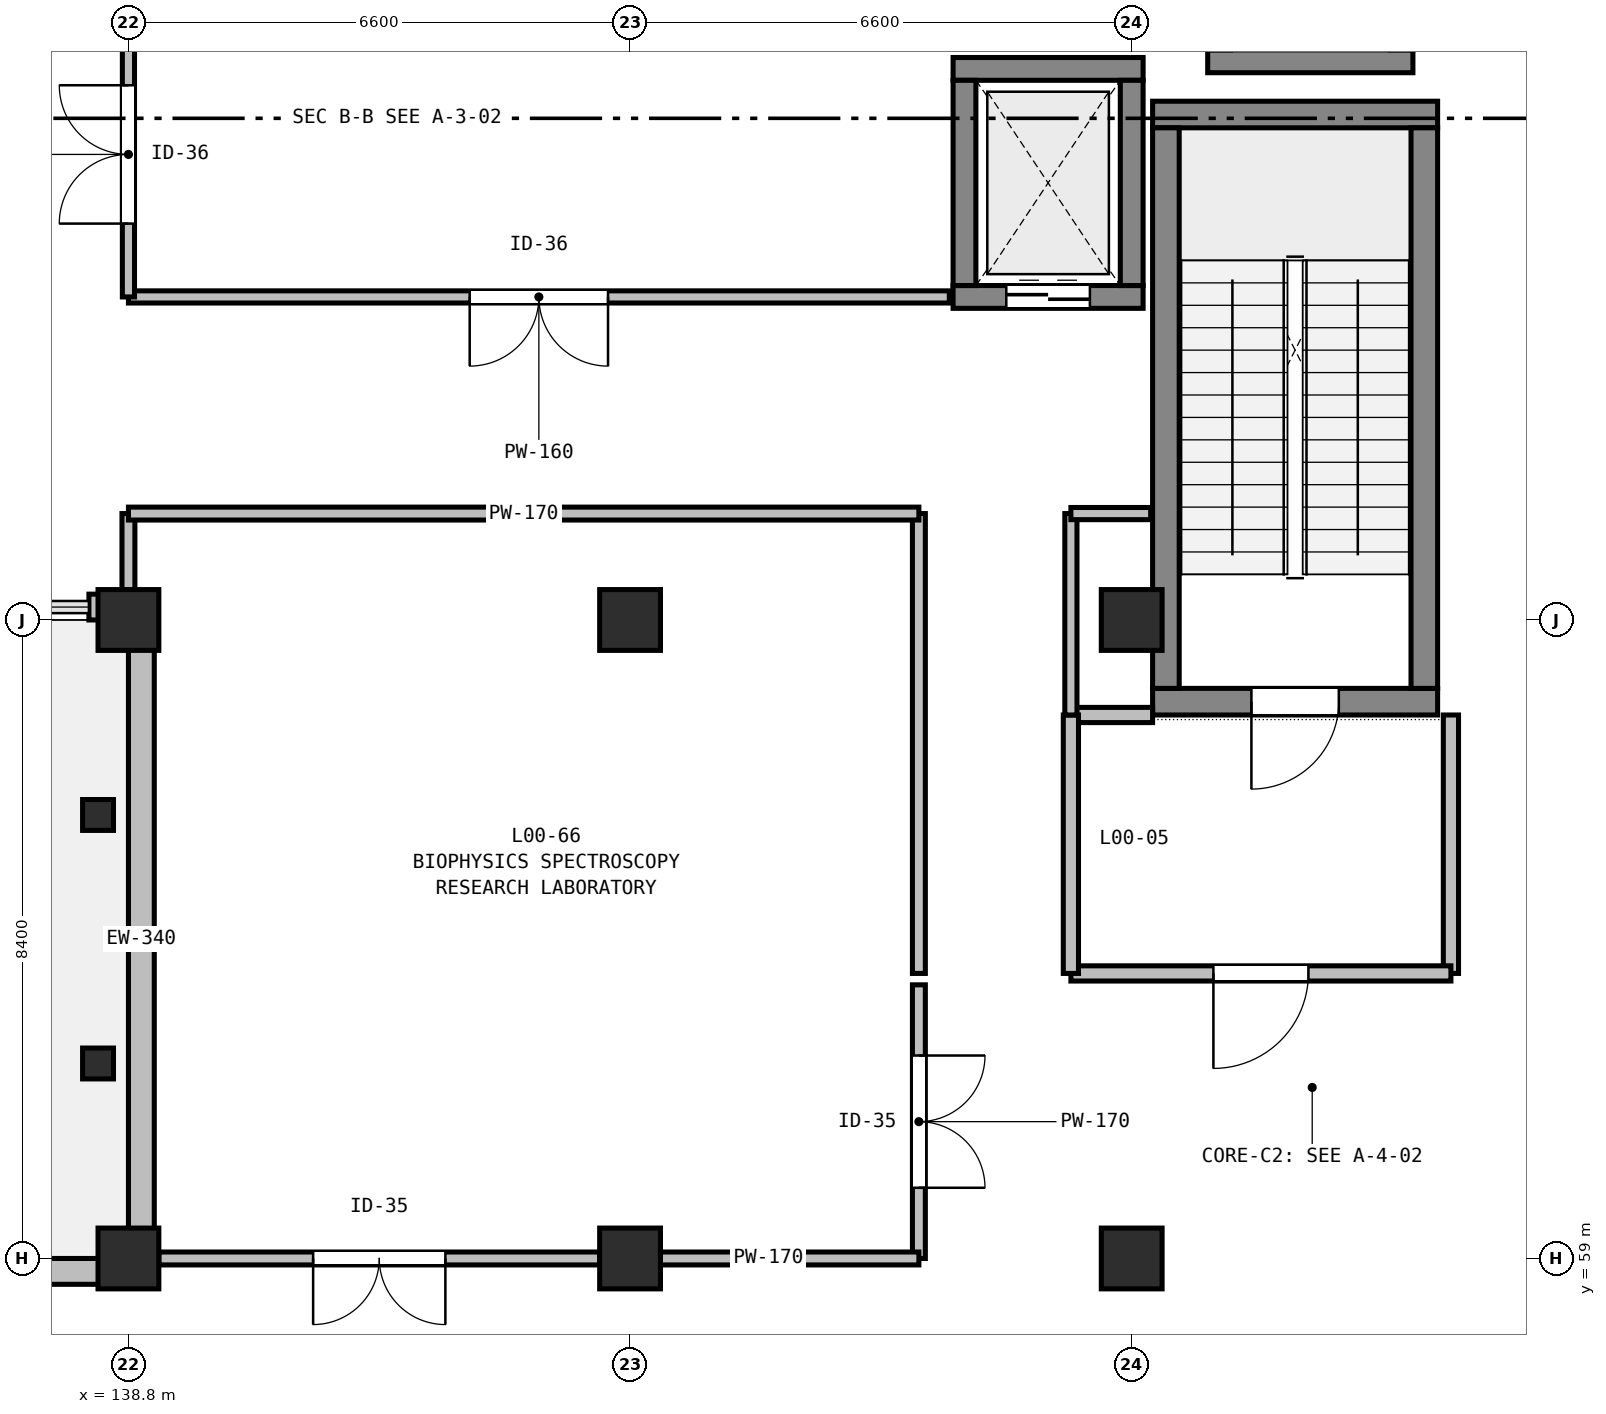
"""IFC4 building model, lengths in metres.
Left out: names, types, materials, properties, quantities, classifications, styles, units other than length and angle.
Written with IfcOpenShell. Run it as: python <this file> out.ifc"""

import sys

from ifc_helpers import new_model, si_unit, direction, frame, frame_2d, origin, origin_2d, place, context, subcontext, project, spatial, rectangle, hollow_circle, extrude, element, fill, save


model = new_model("IFC4")
c1 = context("Model", 3, precision=1e-05, world=origin(), true_north=direction((0.0, 1.0)))
c2 = subcontext(c1, "Body", "Model", "MODEL_VIEW")
j1 = project(units=[si_unit("LENGTHUNIT", "METRE"), si_unit("PLANEANGLEUNIT", "RADIAN")], contexts=[c1])
p1 = place(None, origin())
s1 = spatial("IfcSite", under=j1, at=p1, CompositionType="ELEMENT")
p2 = place(p1, origin())
s2 = spatial("IfcBuilding", under=s1, at=p2, CompositionType="ELEMENT")
p3 = place(p2, origin())
s3 = spatial("IfcBuildingStorey", under=s2, at=p3, CompositionType="ELEMENT", Elevation=0.0)
for number, where, z_axis, x_axis in (
    (1, (138.8, 59.0, 0.0), (0.0, 0.0, 1.0), (1.0, 0.0, 0.0)),
    (2, (138.8, 67.4, 0.0), (0.0, 0.0, 1.0), (1.0, 0.0, 0.0)),
    (3, (145.4, 59.0, 0.0), (0.0, 0.0, 1.0), (1.0, 0.0, 0.0)),
    (4, (145.4, 67.4, 0.0), (0.0, 0.0, 1.0), (1.0, 0.0, 0.0)),
    (5, (152.0, 59.0, 0.0), (0.0, 0.0, 1.0), (1.0, 0.0, 0.0)),
    (6, (152.0, 67.4, 0.0), (0.0, 0.0, 1.0), (1.0, 0.0, 0.0)),
):
    element("IfcColumn", number, at=place(p3, frame(where, z_axis=z_axis, x_axis=x_axis)), inside=s3, PredefinedType="COLUMN", context=c2, shape_type="SweptSolid", body=[
        extrude(rectangle(XDim=0.8, YDim=0.8, at=origin_2d()), origin(), (0.0, 0.0, 1.0), 5.4),
    ])
p4 = place(p3, frame((156.025, 66.325, 0.0), z_axis=(0.0, 0.0, 1.0), x_axis=(-1.0, 0.0, 0.0)))
e7 = element("IfcWall", 7, at=p4, inside=s3, PredefinedType="SHEAR", context=c2, shape_type="SweptSolid", body=[
    extrude(rectangle(XDim=3.75, YDim=0.35, at=frame_2d((1.875, 0.0))), origin(), (0.0, 0.0, 1.0), 5.4),
])
p5 = place(p4, frame((1.3, 0.0, 0.0)))
e8 = element("IfcOpeningElement", 8, at=p5, cuts=e7, PredefinedType="OPENING", context=c2, shape_type="SweptSolid", body=[
    extrude(rectangle(XDim=1.15, YDim=2.15, at=frame_2d((0.575, 1.075))), frame((0.0, 0.185, 0.0), z_axis=(0.0, -1.0, 0.0), x_axis=(1.0, 0.0, 0.0)), (0.0, 0.0, 1.0), 0.37),
])
p6 = place(p3, frame((152.275, 74.05, 0.0), z_axis=(0.0, 0.0, 1.0), x_axis=(1.0, 0.0, 0.0)))
e9 = element("IfcWall", 9, at=p6, inside=s3, PredefinedType="SHEAR", context=c2, shape_type="SweptSolid", body=[
    extrude(rectangle(XDim=3.75, YDim=0.35, at=frame_2d((1.875, 0.0))), origin(), (0.0, 0.0, 1.0), 5.4),
])
for number, where, z_axis, x_axis in (
    (10, (152.45, 66.5, 0.0), (0.0, 0.0, 1.0), (0.0, 1.0, 0.0)),
    (11, (155.85, 66.5, 0.0), (0.0, 0.0, 1.0), (0.0, 1.0, 0.0)),
):
    element("IfcWall", number, at=place(p3, frame(where, z_axis=z_axis, x_axis=x_axis)), inside=s3, PredefinedType="SHEAR", context=c2, shape_type="SweptSolid", body=[
        extrude(rectangle(XDim=7.375, YDim=0.35, at=frame_2d((3.688, 0.0))), origin(), (0.0, 0.0, 1.0), 5.4),
    ])
p7 = place(p3, frame((149.65, 71.65, 0.0), z_axis=(0.0, 0.0, 1.0), x_axis=(1.0, 0.0, 0.0)))
e12 = element("IfcWall", 12, at=p7, inside=s3, PredefinedType="SHEAR", context=c2, shape_type="SweptSolid", body=[
    extrude(rectangle(XDim=2.5, YDim=0.3, at=frame_2d((1.25, 0.0))), origin(), (0.0, 0.0, 1.0), 5.4),
])
p8 = place(p7, frame((0.7, 0.0, 0.0)))
e13 = element("IfcOpeningElement", 13, at=p8, cuts=e12, PredefinedType="OPENING", context=c2, shape_type="SweptSolid", body=[
    extrude(rectangle(XDim=1.1, YDim=2.1, at=frame_2d((0.55, 1.05))), frame((0.0, 0.16, 0.0), z_axis=(0.0, -1.0, 0.0), x_axis=(1.0, 0.0, 0.0)), (0.0, 0.0, 1.0), 0.32),
])
p9 = place(p3, frame((149.65, 74.65, 0.0), z_axis=(0.0, 0.0, 1.0), x_axis=(1.0, 0.0, 0.0)))
e14 = element("IfcWall", 14, at=p9, inside=s3, PredefinedType="SHEAR", context=c2, shape_type="SweptSolid", body=[
    extrude(rectangle(XDim=2.5, YDim=0.3, at=frame_2d((1.25, 0.0))), origin(), (0.0, 0.0, 1.0), 5.4),
])
for number, where, z_axis, x_axis in (
    (15, (149.8, 71.8, 0.0), (0.0, 0.0, 1.0), (0.0, 1.0, 0.0)),
    (16, (152.0, 71.8, 0.0), (0.0, 0.0, 1.0), (0.0, 1.0, 0.0)),
    (17, (153.0, 74.75, 0.0), (0.0, 0.0, 1.0), (1.0, 0.0, 0.0)),
):
    element("IfcWall", number, at=place(p3, frame(where, z_axis=z_axis, x_axis=x_axis)), inside=s3, PredefinedType="SHEAR", context=c2, shape_type="SweptSolid", body=[
        extrude(rectangle(XDim=2.7, YDim=0.3, at=frame_2d((1.35, 0.0))), origin(), (0.0, 0.0, 1.0), 5.4),
    ])
for number, where, z_axis, x_axis in (
    (18, (138.4, 61.565, -0.32), (0.0, 0.0, 1.0), (1.0, 0.0, 0.0)),
    (19, (138.4, 64.835, -0.32), (0.0, 0.0, 1.0), (1.0, 0.0, 0.0)),
):
    element("IfcColumn", number, at=place(p3, frame(where, z_axis=z_axis, x_axis=x_axis)), inside=s3, PredefinedType="COLUMN", context=c2, shape_type="SweptSolid", body=[
        extrude(hollow_circle(Radius=0.203, WallThickness=0.014, at=origin_2d()), origin(), (0.0, 0.0, 1.0), 5.72),
    ])
p10 = place(p3, frame((132.2, 58.83, 0.0), z_axis=(0.0, 0.0, 1.0), x_axis=(1.0, 0.0, 0.0)))
e20 = element("IfcWall", 20, at=p10, inside=s3, PredefinedType="STANDARD", context=c2, shape_type="SweptSolid", body=[
    extrude(rectangle(XDim=6.6, YDim=0.34, at=frame_2d((3.3, 0.0))), origin(), (0.0, 0.0, 1.0), 4.535),
])
p11 = place(p10, frame((3.19, 0.0, 0.75)))
e21 = element("IfcOpeningElement", 21, at=p11, cuts=e20, PredefinedType="OPENING", context=c2, shape_type="SweptSolid", body=[
    extrude(rectangle(XDim=2.15, YDim=2.4, at=frame_2d((1.075, 1.2))), frame((0.0, 0.18, 0.0), z_axis=(0.0, -1.0, 0.0), x_axis=(1.0, 0.0, 0.0)), (0.0, 0.0, 1.0), 0.36),
])
p12 = place(p3, frame((138.97, 59.34, 0.0), z_axis=(0.0, 0.0, 1.0), x_axis=(0.0, 1.0, 0.0)))
e22 = element("IfcWall", 22, at=p12, inside=s3, PredefinedType="STANDARD", context=c2, shape_type="SweptSolid", body=[
    extrude(rectangle(XDim=7.72, YDim=0.34, at=frame_2d((3.86, 0.0))), origin(), (0.0, 0.0, 1.0), 4.685),
])
p13 = place(p3, frame((138.8, 67.57, 0.0), z_axis=(0.0, 0.0, 1.0), x_axis=(-1.0, 0.0, 0.0)))
e23 = element("IfcWall", 23, at=p13, inside=s3, PredefinedType="STANDARD", context=c2, shape_type="SweptSolid", body=[
    extrude(rectangle(XDim=0.52, YDim=0.34, at=frame_2d((0.26, 0.0))), origin(), (0.0, 0.0, 1.0), 4.535),
])
p14 = place(p3, frame((151.2, 66.15, 0.0), z_axis=(0.0, 0.0, 1.0), x_axis=(1.0, 0.0, 0.0)))
e24 = element("IfcWall", 24, at=p14, inside=s3, PredefinedType="PARTITIONING", context=c2, shape_type="SweptSolid", body=[
    extrude(rectangle(XDim=1.075, YDim=0.2, at=frame_2d((0.538, 0.0))), origin(), (0.0, 0.0, 1.0), 4.535),
])
p15 = place(p3, frame((156.2, 66.15, 0.0), z_axis=(0.0, 0.0, 1.0), x_axis=(0.0, -1.0, 0.0)))
e25 = element("IfcWall", 25, at=p15, inside=s3, PredefinedType="PARTITIONING", context=c2, shape_type="SweptSolid", body=[
    extrude(rectangle(XDim=3.4, YDim=0.2, at=frame_2d((1.7, 0.0))), origin(), (0.0, 0.0, 1.0), 5.095),
])
p16 = place(p3, frame((156.2, 62.75, 0.0), z_axis=(0.0, 0.0, 1.0), x_axis=(-1.0, 0.0, 0.0)))
e26 = element("IfcWall", 26, at=p16, inside=s3, PredefinedType="PARTITIONING", context=c2, shape_type="SweptSolid", body=[
    extrude(rectangle(XDim=5.0, YDim=0.2, at=frame_2d((2.5, 0.0))), origin(), (0.0, 0.0, 1.0), 4.535),
])
p17 = place(p16, frame((1.875, 0.0, 0.0)))
e27 = element("IfcOpeningElement", 27, at=p17, cuts=e26, PredefinedType="OPENING", context=c2, shape_type="SweptSolid", body=[
    extrude(rectangle(XDim=1.25, YDim=2.15, at=frame_2d((0.625, 1.075))), frame((0.0, 0.11, 0.0), z_axis=(0.0, -1.0, 0.0), x_axis=(1.0, 0.0, 0.0)), (0.0, 0.0, 1.0), 0.22),
])
p18 = place(p3, frame((151.2, 62.75, 0.0), z_axis=(0.0, 0.0, 1.0), x_axis=(0.0, 1.0, 0.0)))
e28 = element("IfcWall", 28, at=p18, inside=s3, PredefinedType="PARTITIONING", context=c2, shape_type="SweptSolid", body=[
    extrude(rectangle(XDim=3.4, YDim=0.2, at=frame_2d((1.7, 0.0))), origin(), (0.0, 0.0, 1.0), 5.095),
])
p19 = place(p3, frame((149.2, 68.8, 0.0), z_axis=(0.0, 0.0, 1.0), x_axis=(0.0, -1.0, 0.0)))
e29 = element("IfcWall", 29, at=p19, inside=s3, PredefinedType="PARTITIONING", context=c2, shape_type="SweptSolid", body=[
    extrude(rectangle(XDim=6.05, YDim=0.17, at=frame_2d((3.025, 0.0))), origin(), (0.0, 0.0, 1.0), 4.735),
])
p20 = place(p3, frame((149.2, 62.6, 0.0), z_axis=(0.0, 0.0, 1.0), x_axis=(0.0, -1.0, 0.0)))
e30 = element("IfcWall", 30, at=p20, inside=s3, PredefinedType="PARTITIONING", context=c2, shape_type="SweptSolid", body=[
    extrude(rectangle(XDim=3.6, YDim=0.17, at=frame_2d((1.8, 0.0))), origin(), (0.0, 0.0, 1.0), 4.735),
])
p21 = place(p20, frame((0.93, 0.0, 0.0)))
e31 = element("IfcOpeningElement", 31, at=p21, cuts=e30, PredefinedType="OPENING", context=c2, shape_type="SweptSolid", body=[
    extrude(rectangle(XDim=1.74, YDim=2.2, at=frame_2d((0.87, 1.1))), frame((0.0, 0.095, 0.0), z_axis=(0.0, -1.0, 0.0), x_axis=(1.0, 0.0, 0.0)), (0.0, 0.0, 1.0), 0.19),
])
p22 = place(p3, frame((149.2, 59.0, 0.0), z_axis=(0.0, 0.0, 1.0), x_axis=(-1.0, 0.0, 0.0)))
e32 = element("IfcWall", 32, at=p22, inside=s3, PredefinedType="PARTITIONING", context=c2, shape_type="SweptSolid", body=[
    extrude(rectangle(XDim=3.4, YDim=0.17, at=frame_2d((1.7, 0.0))), origin(), (0.0, 0.0, 1.0), 4.735),
])
p23 = place(p3, frame((145.0, 59.0, 0.0), z_axis=(0.0, 0.0, 1.0), x_axis=(-1.0, 0.0, 0.0)))
e33 = element("IfcWall", 33, at=p23, inside=s3, PredefinedType="PARTITIONING", context=c2, shape_type="SweptSolid", body=[
    extrude(rectangle(XDim=5.8, YDim=0.17, at=frame_2d((2.9, 0.0))), origin(), (0.0, 0.0, 1.0), 4.735),
])
p24 = place(p23, frame((2.03, 0.0, 0.0)))
e34 = element("IfcOpeningElement", 34, at=p24, cuts=e33, PredefinedType="OPENING", context=c2, shape_type="SweptSolid", body=[
    extrude(rectangle(XDim=1.74, YDim=2.2, at=frame_2d((0.87, 1.1))), frame((0.0, 0.095, 0.0), z_axis=(0.0, -1.0, 0.0), x_axis=(1.0, 0.0, 0.0)), (0.0, 0.0, 1.0), 0.19),
])
p25 = place(p3, frame((138.8, 67.8, 0.0), z_axis=(0.0, 0.0, 1.0), x_axis=(0.0, 1.0, 0.0)))
e35 = element("IfcWall", 35, at=p25, inside=s3, PredefinedType="PARTITIONING", context=c2, shape_type="SweptSolid", body=[
    extrude(rectangle(XDim=1.0, YDim=0.17, at=frame_2d((0.5, 0.0))), origin(), (0.0, 0.0, 1.0), 4.535),
])
p26 = place(p3, frame((138.8, 68.8, 0.0), z_axis=(0.0, 0.0, 1.0), x_axis=(1.0, 0.0, 0.0)))
e36 = element("IfcWall", 36, at=p26, inside=s3, PredefinedType="PARTITIONING", context=c2, shape_type="SweptSolid", body=[
    extrude(rectangle(XDim=10.4, YDim=0.17, at=frame_2d((5.2, 0.0))), origin(), (0.0, 0.0, 1.0), 4.535),
])
p27 = place(p3, frame((151.2, 66.15, 0.0), z_axis=(0.0, 0.0, 1.0), x_axis=(0.0, 1.0, 0.0)))
e37 = element("IfcWall", 37, at=p27, inside=s3, PredefinedType="PARTITIONING", context=c2, shape_type="SweptSolid", body=[
    extrude(rectangle(XDim=2.65, YDim=0.16, at=frame_2d((1.325, 0.0))), origin(), (0.0, 0.0, 1.0), 4.735),
])
p28 = place(p3, frame((151.2, 68.8, 0.0), z_axis=(0.0, 0.0, 1.0), x_axis=(1.0, 0.0, 0.0)))
e38 = element("IfcWall", 38, at=p28, inside=s3, PredefinedType="PARTITIONING", context=c2, shape_type="SweptSolid", body=[
    extrude(rectangle(XDim=1.05, YDim=0.16, at=frame_2d((0.525, 0.0))), origin(), (0.0, 0.0, 1.0), 4.535),
])
p29 = place(p3, frame((149.6, 71.65, 0.0), z_axis=(0.0, 0.0, 1.0), x_axis=(-1.0, 0.0, 0.0)))
e39 = element("IfcWall", 39, at=p29, inside=s3, PredefinedType="PARTITIONING", context=c2, shape_type="SweptSolid", body=[
    extrude(rectangle(XDim=10.8, YDim=0.16, at=frame_2d((5.4, 0.0))), origin(), (0.0, 0.0, 1.0), 4.535),
])
p30 = place(p29, frame((4.49, 0.0, 0.0)))
e40 = element("IfcOpeningElement", 40, at=p30, cuts=e39, PredefinedType="OPENING", context=c2, shape_type="SweptSolid", body=[
    extrude(rectangle(XDim=1.82, YDim=2.2, at=frame_2d((0.91, 1.1))), frame((0.0, 0.09, 0.0), z_axis=(0.0, -1.0, 0.0), x_axis=(1.0, 0.0, 0.0)), (0.0, 0.0, 1.0), 0.18),
])
p31 = place(p3, frame((138.8, 71.65, 0.0), z_axis=(0.0, 0.0, 1.0), x_axis=(0.0, 1.0, 0.0)))
e41 = element("IfcWall", 41, at=p31, inside=s3, PredefinedType="PARTITIONING", context=c2, shape_type="SweptSolid", body=[
    extrude(rectangle(XDim=3.75, YDim=0.16, at=frame_2d((1.875, 0.0))), origin(), (0.0, 0.0, 1.0), 4.535),
])
p32 = place(p31, frame((0.965, 0.0, 0.0)))
e42 = element("IfcOpeningElement", 42, at=p32, cuts=e41, PredefinedType="OPENING", context=c2, shape_type="SweptSolid", body=[
    extrude(rectangle(XDim=1.82, YDim=2.2, at=frame_2d((0.91, 1.1))), frame((0.0, 0.09, 0.0), z_axis=(0.0, -1.0, 0.0), x_axis=(1.0, 0.0, 0.0)), (0.0, 0.0, 1.0), 0.18),
])
p33 = place(p5, origin())
e43 = element("IfcDoor", 43, at=p33, inside=s3, OperationType="SINGLE_SWING_RIGHT", PredefinedType="DOOR", context=c2, shape_type="SweptSolid", body=[
    extrude(rectangle(XDim=1.15, YDim=2.15, at=frame_2d((0.575, 1.075))), frame((0.0, 0.025, 0.0), z_axis=(0.0, -1.0, 0.0), x_axis=(1.0, 0.0, 0.0)), (0.0, 0.0, 1.0), 0.05),
])
fill(e8, e43)
p34 = place(p8, origin())
e44 = element("IfcDoor", 44, at=p34, inside=s3, OperationType="DOUBLE_DOOR_SLIDING", PredefinedType="DOOR", context=c2, shape_type="SweptSolid", body=[
    extrude(rectangle(XDim=1.1, YDim=2.1, at=frame_2d((0.55, 1.05))), frame((0.0, 0.025, 0.0), z_axis=(0.0, -1.0, 0.0), x_axis=(1.0, 0.0, 0.0)), (0.0, 0.0, 1.0), 0.05),
])
fill(e13, e44)
p35 = place(p17, origin())
e45 = element("IfcDoor", 45, at=p35, inside=s3, OperationType="SINGLE_SWING_RIGHT", PredefinedType="DOOR", context=c2, shape_type="SweptSolid", body=[
    extrude(rectangle(XDim=1.25, YDim=2.15, at=frame_2d((0.625, 1.075))), frame((0.0, 0.025, 0.0), z_axis=(0.0, -1.0, 0.0), x_axis=(1.0, 0.0, 0.0)), (0.0, 0.0, 1.0), 0.05),
])
fill(e27, e45)
p36 = place(p24, origin())
e46 = element("IfcDoor", 46, at=p36, inside=s3, OperationType="DOUBLE_DOOR_SINGLE_SWING", PredefinedType="DOOR", context=c2, shape_type="SweptSolid", body=[
    extrude(rectangle(XDim=1.74, YDim=2.2, at=frame_2d((0.87, 1.1))), frame((0.0, 0.025, 0.0), z_axis=(0.0, -1.0, 0.0), x_axis=(1.0, 0.0, 0.0)), (0.0, 0.0, 1.0), 0.05),
])
fill(e34, e46)
p37 = place(p21, origin())
e47 = element("IfcDoor", 47, at=p37, inside=s3, OperationType="DOUBLE_DOOR_SINGLE_SWING", PredefinedType="DOOR", context=c2, shape_type="SweptSolid", body=[
    extrude(rectangle(XDim=1.74, YDim=2.2, at=frame_2d((0.87, 1.1))), frame((0.0, 0.025, 0.0), z_axis=(0.0, -1.0, 0.0), x_axis=(1.0, 0.0, 0.0)), (0.0, 0.0, 1.0), 0.05),
])
fill(e31, e47)
p38 = place(p30, origin())
e48 = element("IfcDoor", 48, at=p38, inside=s3, OperationType="DOUBLE_DOOR_SINGLE_SWING", PredefinedType="DOOR", context=c2, shape_type="SweptSolid", body=[
    extrude(rectangle(XDim=1.82, YDim=2.2, at=frame_2d((0.91, 1.1))), frame((0.0, 0.025, 0.0), z_axis=(0.0, -1.0, 0.0), x_axis=(1.0, 0.0, 0.0)), (0.0, 0.0, 1.0), 0.05),
])
fill(e40, e48)
p39 = place(p32, origin())
e49 = element("IfcDoor", 49, at=p39, inside=s3, OperationType="DOUBLE_DOOR_SINGLE_SWING", PredefinedType="DOOR", context=c2, shape_type="SweptSolid", body=[
    extrude(rectangle(XDim=1.82, YDim=2.2, at=frame_2d((0.91, 1.1))), frame((0.0, 0.025, 0.0), z_axis=(0.0, -1.0, 0.0), x_axis=(1.0, 0.0, 0.0)), (0.0, 0.0, 1.0), 0.05),
])
fill(e42, e49)
save(model, sys.argv[1])
